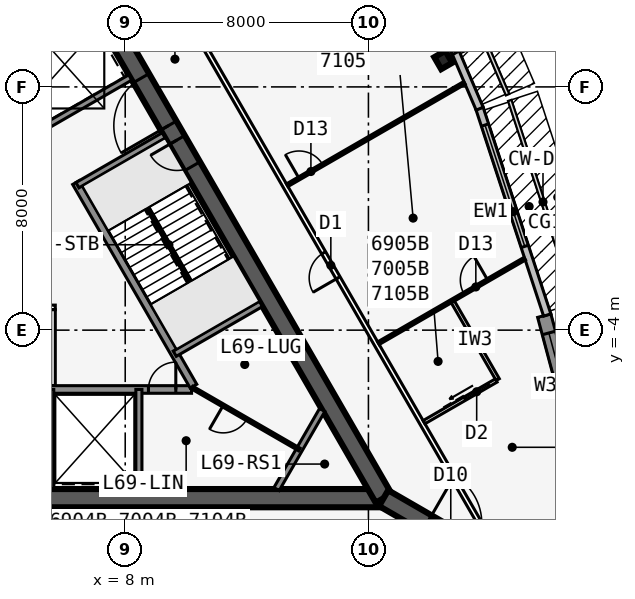
"""IFC4 building model, lengths in metres.
Left out: names, types, materials, properties, quantities, classifications, styles, units other than length and angle.
Written with IfcOpenShell. Run it as: python <this file> out.ifc"""

import sys

from ifc_helpers import new_model, si_unit, direction, frame, frame_2d, origin, origin_2d, place, context, subcontext, project, spatial, polyline, rectangle, i_section, outline, extrude, element, fill, save


model = new_model("IFC4")
c1 = context("Model", 3, precision=1e-05, world=origin(), true_north=direction((0.0, 1.0)))
c2 = subcontext(c1, "Body", "Model", "MODEL_VIEW")
j1 = project(units=[si_unit("LENGTHUNIT", "METRE"), si_unit("PLANEANGLEUNIT", "RADIAN")], contexts=[c1])
p1 = place(None, origin())
s1 = spatial("IfcSite", under=j1, at=p1, CompositionType="ELEMENT")
p2 = place(p1, origin())
s2 = spatial("IfcBuilding", under=s1, at=p2, CompositionType="ELEMENT")
p3 = place(p2, frame((0.0, 0.0, 260.9)))
s3 = spatial("IfcBuildingStorey", under=s2, at=p3, CompositionType="ELEMENT", Elevation=260.9)
p4 = place(p3, frame((-16.5, -9.526, 0.0), z_axis=(0.0, 0.0, 1.0), x_axis=(1.0, 0.0, 0.0)))
e1 = element("IfcWall", 1, at=p4, inside=s3, PredefinedType="SHEAR", context=c2, shape_type="SweptSolid", body=[
    extrude(rectangle(XDim=33.0, YDim=0.6, at=frame_2d((16.5, 0.0))), origin(), (0.0, 0.0, 1.0), 3.6),
])
p5 = place(p4, frame((14.05, 0.0, 0.0)))
e2 = element("IfcOpeningElement", 2, at=p5, cuts=e1, PredefinedType="OPENING", context=c2, shape_type="SweptSolid", body=[
    extrude(rectangle(XDim=1.8, YDim=2.13, at=frame_2d((0.9, 1.065))), frame((0.0, 0.31, 0.0), z_axis=(0.0, -1.0, 0.0), x_axis=(1.0, 0.0, 0.0)), (0.0, 0.0, 1.0), 0.62),
])
p6 = place(p3, frame((-0.55, -5.951, 0.0), z_axis=(0.0, 0.0, 1.0), x_axis=(1.0, 0.0, 0.0)))
e3 = element("IfcWall", 3, at=p6, inside=s3, PredefinedType="SOLIDWALL", context=c2, shape_type="SweptSolid", body=[
    extrude(rectangle(XDim=10.733, YDim=0.25, at=frame_2d((5.366, 0.0))), origin(), (0.0, 0.0, 1.0), 3.435),
])
p7 = place(p6, frame((9.314, 0.0, 0.0)))
e4 = element("IfcOpeningElement", 4, at=p7, cuts=e3, PredefinedType="OPENING", context=c2, shape_type="SweptSolid", body=[
    extrude(rectangle(XDim=0.9, YDim=2.13, at=frame_2d((0.45, 1.065))), frame((0.0, 0.135, 0.0), z_axis=(0.0, -1.0, 0.0), x_axis=(1.0, 0.0, 0.0)), (0.0, 0.0, 1.0), 0.27),
])
p8 = place(p6, frame((1.05, 0.0, 0.0)))
e5 = element("IfcOpeningElement", 5, at=p8, cuts=e3, PredefinedType="OPENING", context=c2, shape_type="SweptSolid", body=[
    extrude(rectangle(XDim=1.1, YDim=2.13, at=frame_2d((0.55, 1.065))), frame((0.0, 0.135, 0.0), z_axis=(0.0, -1.0, 0.0), x_axis=(1.0, 0.0, 0.0)), (0.0, 0.0, 1.0), 0.27),
])
p9 = place(p6, frame((4.05, 0.0, 0.0)))
e6 = element("IfcOpeningElement", 6, at=p9, cuts=e3, PredefinedType="OPENING", context=c2, shape_type="SweptSolid", body=[
    extrude(rectangle(XDim=1.1, YDim=2.13, at=frame_2d((0.55, 1.065))), frame((0.0, 0.135, 0.0), z_axis=(0.0, -1.0, 0.0), x_axis=(1.0, 0.0, 0.0)), (0.0, 0.0, 1.0), 0.27),
])
for number, where, z_axis, x_axis in (
    (7, (5.55, -5.951, 0.0), (0.0, 0.0, 1.0), (0.0, -1.0, 0.0)),
    (8, (8.45, -5.951, 0.0), (0.0, 0.0, 1.0), (0.0, -1.0, 0.0)),
):
    element("IfcWall", number, at=place(p3, frame(where, z_axis=z_axis, x_axis=x_axis)), inside=s3, PredefinedType="SOLIDWALL", context=c2, shape_type="SweptSolid", body=[
        extrude(rectangle(XDim=3.275, YDim=0.2, at=frame_2d((1.637, 0.0))), origin(), (0.0, 0.0, 1.0), 3.435),
    ])
p10 = place(p3, frame((16.5, -9.526, 0.0), z_axis=(0.0, 0.0, 1.0), x_axis=(-0.499999749417, 0.866025548458, 0.0)))
e9 = element("IfcWall", 9, at=p10, inside=s3, PredefinedType="SHEAR", context=c2, shape_type="SweptSolid", body=[
    extrude(rectangle(XDim=33.0, YDim=0.6, at=frame_2d((16.5, 0.0))), origin(), (0.0, 0.0, 1.0), 3.6),
])
p11 = place(p10, frame((14.15, 0.0, 0.0)))
e10 = element("IfcOpeningElement", 10, at=p11, cuts=e9, PredefinedType="OPENING", context=c2, shape_type="SweptSolid", body=[
    extrude(rectangle(XDim=1.8, YDim=2.13, at=frame_2d((0.9, 1.065))), frame((0.0, 0.31, 0.0), z_axis=(0.0, -1.0, 0.0), x_axis=(1.0, 0.0, 0.0)), (0.0, 0.0, 1.0), 0.62),
])
p12 = place(p10, frame((12.6, 0.0, 0.0)))
e11 = element("IfcOpeningElement", 11, at=p12, cuts=e9, PredefinedType="OPENING", context=c2, shape_type="SweptSolid", body=[
    extrude(rectangle(XDim=1.0, YDim=2.13, at=frame_2d((0.5, 1.065))), frame((0.0, 0.31, 0.0), z_axis=(0.0, -1.0, 0.0), x_axis=(1.0, 0.0, 0.0)), (0.0, 0.0, 1.0), 0.62),
])
p13 = place(p3, frame((10.245, -5.843, 0.0), z_axis=(0.0, 0.0, 1.0), x_axis=(-0.499993009313, 0.866029439822, 0.0)))
e12 = element("IfcWall", 12, at=p13, inside=s3, PredefinedType="SOLIDWALL", context=c2, shape_type="SweptSolid", body=[
    extrude(rectangle(XDim=7.733, YDim=0.25, at=frame_2d((3.866, 0.0))), origin(), (0.0, 0.0, 1.0), 3.435),
])
p14 = place(p3, frame((9.629, -4.775, 0.0), z_axis=(0.0, 0.0, 1.0), x_axis=(0.865995643347, 0.500051543047, 0.0)))
e13 = element("IfcWall", 13, at=p14, inside=s3, PredefinedType="SOLIDWALL", context=c2, shape_type="SweptSolid", body=[
    extrude(rectangle(XDim=3.275, YDim=0.2, at=frame_2d((1.638, 0.0))), origin(), (0.0, 0.0, 1.0), 3.435),
])
for number, where, z_axis, x_axis in (
    (14, (6.429, 0.767, 0.0), (0.0, 0.0, 1.0), (0.866, 0.5, 0.0)),
    (15, (5.329, 2.673, 0.0), (0.0, 0.0, 1.0), (0.866, 0.5, 0.0)),
    (16, (3.879, 5.184, 0.0), (0.0, 0.0, 1.0), (0.866, 0.5, 0.0)),
):
    element("IfcWall", number, at=place(p3, frame(where, z_axis=z_axis, x_axis=x_axis)), inside=s3, PredefinedType="SOLIDWALL", context=c2, shape_type="SweptSolid", body=[
        extrude(rectangle(XDim=3.275, YDim=0.2, at=frame_2d((1.637, 0.0))), origin(), (0.0, 0.0, 1.0), 3.435),
    ])
p15 = place(p3, frame((16.5, -9.526, 0.0), z_axis=(0.0, 0.0, 1.0), x_axis=(0.866031398331, -0.499989616998, 0.0)))
e17 = element("IfcWall", 17, at=p15, inside=s3, PredefinedType="SHEAR", context=c2, shape_type="SweptSolid", body=[
    extrude(rectangle(XDim=4.746, YDim=0.6, at=frame_2d((2.373, 0.0))), origin(), (0.0, 0.0, 1.0), 3.6),
])
p16 = place(p15, frame((1.65, 0.0, 0.0)))
e18 = element("IfcOpeningElement", 18, at=p16, cuts=e17, PredefinedType="OPENING", context=c2, shape_type="SweptSolid", body=[
    extrude(rectangle(XDim=1.8, YDim=2.13, at=frame_2d((0.9, 1.065))), frame((0.0, 0.31, 0.0), z_axis=(0.0, -1.0, 0.0), x_axis=(1.0, 0.0, 0.0)), (0.0, 0.0, 1.0), 0.62),
])
p17 = place(p3, frame((18.461, 4.885, 0.0), z_axis=(0.0, 0.0, 1.0), x_axis=(0.866025403784, 0.5, 0.0)))
e19 = element("IfcColumn", 19, at=p17, inside=s3, PredefinedType="COLUMN", context=c2, shape_type="SweptSolid", body=[
    extrude(i_section(OverallWidth=0.419, OverallDepth=0.455, WebThickness=0.042, FlangeThickness=0.068, at=origin_2d()), origin(), (0.0, 0.0, 1.0), 3.6),
])
p18 = place(p3, frame((21.783, -12.644, 0.0), z_axis=(0.0, 0.0, 1.0), x_axis=(0.25880328844, 0.965930048136, 0.0)))
e20 = element("IfcWall", 20, at=p18, inside=s3, PredefinedType="SOLIDWALL", context=c2, shape_type="SweptSolid", body=[
    extrude(outline(polyline([(4.782, 0.225), (0.431, 0.225), (0.406, 0.132), (0.06, 0.225), (0.0, 0.225), (0.0, -0.225), (4.782, -0.225), (4.782, 0.225)])), origin(), (0.0, 0.0, 1.0), 3.435),
])
p19 = place(p18, frame((1.031, 0.0, 0.45)))
e21 = element("IfcOpeningElement", 21, at=p19, cuts=e20, PredefinedType="OPENING", context=c2, shape_type="SweptSolid", body=[
    extrude(rectangle(XDim=3.0, YDim=2.6, at=frame_2d((1.5, 1.3))), frame((0.0, 0.235, 0.0), z_axis=(0.0, -1.0, 0.0), x_axis=(1.0, 0.0, 0.0)), (0.0, 0.0, 1.0), 0.47),
])
p20 = place(p3, frame((23.02, -8.141, 0.0), z_axis=(0.0, 0.0, 1.0), x_axis=(-0.25880328844, 0.965930048136, 0.0)))
e22 = element("IfcWall", 22, at=p20, inside=s3, PredefinedType="SOLIDWALL", context=c2, shape_type="SweptSolid", body=[
    extrude(rectangle(XDim=4.782, YDim=0.45, at=frame_2d((2.391, 0.0))), origin(), (0.0, 0.0, 1.0), 3.435),
])
p21 = place(p20, frame((0.591, 0.0, 0.45)))
e23 = element("IfcOpeningElement", 23, at=p21, cuts=e22, PredefinedType="OPENING", context=c2, shape_type="SweptSolid", body=[
    extrude(rectangle(XDim=3.6, YDim=2.6, at=frame_2d((1.8, 1.3))), frame((0.0, 0.235, 0.0), z_axis=(0.0, -1.0, 0.0), x_axis=(1.0, 0.0, 0.0)), (0.0, 0.0, 1.0), 0.47),
])
p22 = place(p3, frame((21.881, -3.503, 0.0), z_axis=(0.0, 0.0, 1.0), x_axis=(-0.311328857048, 0.95030223759, 0.0)))
e24 = element("IfcWall", 24, at=p22, inside=s3, PredefinedType="STANDARD", context=c2, shape_type="SweptSolid", body=[
    extrude(rectangle(XDim=7.153, YDim=0.25, at=frame_2d((3.576, 0.0))), origin(), (0.0, 0.0, 1.0), 3.435),
])
p23 = place(p22, frame((2.376, 0.0, 0.45)))
e25 = element("IfcOpeningElement", 25, at=p23, cuts=e24, PredefinedType="OPENING", context=c2, shape_type="SweptSolid", body=[
    extrude(rectangle(XDim=4.2, YDim=2.6, at=frame_2d((2.1, 1.3))), frame((0.0, 0.135, 0.0), z_axis=(0.0, -1.0, 0.0), x_axis=(1.0, 0.0, 0.0)), (0.0, 0.0, 1.0), 0.27),
])
p24 = place(p3, frame((19.658, 3.284, 0.0), z_axis=(0.0, 0.0, 1.0), x_axis=(-0.393290226175, 0.91941437774, 0.0)))
e26 = element("IfcWall", 26, at=p24, inside=s3, PredefinedType="STANDARD", context=c2, shape_type="SweptSolid", body=[
    extrude(rectangle(XDim=2.014, YDim=0.25, at=frame_2d((1.007, 0.0))), origin(), (0.0, 0.0, 1.0), 3.435),
])
p25 = place(p3, frame((18.873, 5.123, 0.0), z_axis=(0.0, 0.0, 1.0), x_axis=(-0.499993662806, 0.866029062534, 0.0)))
e27 = element("IfcWall", 27, at=p25, inside=s3, PredefinedType="STANDARD", context=c2, shape_type="SweptSolid", body=[
    extrude(rectangle(XDim=10.0, YDim=0.25, at=frame_2d((5.0, 0.0))), origin(), (0.0, 0.0, 1.0), 3.435),
])
p26 = place(p25, frame((2.9, 0.0, 0.45)))
e28 = element("IfcOpeningElement", 28, at=p26, cuts=e27, PredefinedType="OPENING", context=c2, shape_type="SweptSolid", body=[
    extrude(rectangle(XDim=4.2, YDim=2.6, at=frame_2d((2.1, 1.3))), frame((0.0, 0.135, 0.0), z_axis=(0.0, -1.0, 0.0), x_axis=(1.0, 0.0, 0.0)), (0.0, 0.0, 1.0), 0.27),
])
p27 = place(p3, frame((20.177, -11.245, 0.0), z_axis=(0.0, 0.0, 1.0), x_axis=(-0.499998875317, 0.866026053119, 0.0)))
e29 = element("IfcWall", 29, at=p27, inside=s3, PredefinedType="PARTITIONING", context=c2, shape_type="SweptSolid", body=[
    extrude(rectangle(XDim=39.654, YDim=0.15, at=frame_2d((19.827, 0.0))), origin(), (0.0, 0.0, 1.0), 3.435),
])
p28 = place(p27, frame((10.352, 0.0, 0.0)))
e30 = element("IfcOpeningElement", 30, at=p28, cuts=e29, PredefinedType="OPENING", context=c2, shape_type="SweptSolid", body=[
    extrude(rectangle(XDim=0.95, YDim=2.13, at=frame_2d((0.475, 1.065))), frame((0.0, 0.085, 0.0), z_axis=(0.0, -1.0, 0.0), x_axis=(1.0, 0.0, 0.0)), (0.0, 0.0, 1.0), 0.17),
])
p29 = place(p3, frame((16.329, -4.429, 0.0), z_axis=(0.0, 0.0, 1.0), x_axis=(0.866029066823, 0.499993655377, 0.0)))
e31 = element("IfcWall", 31, at=p29, inside=s3, PredefinedType="PARTITIONING", context=c2, shape_type="SweptSolid", body=[
    extrude(rectangle(XDim=5.559, YDim=0.1, at=frame_2d((2.779, 0.0))), origin(), (0.0, 0.0, 1.0), 2.823),
])
p30 = place(p29, frame((3.25, 0.0, 0.0)))
e32 = element("IfcOpeningElement", 32, at=p30, cuts=e31, PredefinedType="OPENING", context=c2, shape_type="SweptSolid", body=[
    extrude(rectangle(XDim=0.9, YDim=2.13, at=frame_2d((0.45, 1.065))), frame((0.0, 0.06, 0.0), z_axis=(0.0, -1.0, 0.0), x_axis=(1.0, 0.0, 0.0)), (0.0, 0.0, 1.0), 0.12),
])
p31 = place(p3, frame((13.329, 0.767, 0.0), z_axis=(0.0, 0.0, 1.0), x_axis=(0.866020720842, 0.500008111007, 0.0)))
e33 = element("IfcWall", 33, at=p31, inside=s3, PredefinedType="PARTITIONING", context=c2, shape_type="SweptSolid", body=[
    extrude(rectangle(XDim=6.732, YDim=0.1, at=frame_2d((3.366, 0.0))), origin(), (0.0, 0.0, 1.0), 3.435),
])
p32 = place(p31, frame((0.45, 0.0, 0.0)))
e34 = element("IfcOpeningElement", 34, at=p32, cuts=e33, PredefinedType="OPENING", context=c2, shape_type="SweptSolid", body=[
    extrude(rectangle(XDim=0.9, YDim=2.13, at=frame_2d((0.45, 1.065))), frame((0.0, 0.06, 0.0), z_axis=(0.0, -1.0, 0.0), x_axis=(1.0, 0.0, 0.0)), (0.0, 0.0, 1.0), 0.12),
])
p33 = place(p3, frame((20.253, -5.627, 0.0), z_axis=(0.0, 0.0, 1.0), x_axis=(-0.50002537861, 0.866010750942, 0.0)))
e35 = element("IfcWall", 35, at=p33, inside=s3, PredefinedType="PLUMBINGWALL", context=c2, shape_type="SweptSolid", body=[
    extrude(rectangle(XDim=3.0, YDim=0.12, at=frame_2d((1.5, 0.0))), origin(), (0.0, 0.0, 1.0), 3.435),
])
p34 = place(p3, frame((17.829, -7.027, 0.0), z_axis=(0.0, 0.0, 1.0), x_axis=(0.866035715982, 0.499982138324, 0.0)))
e36 = element("IfcWall", 36, at=p34, inside=s3, PredefinedType="PLUMBINGWALL", context=c2, shape_type="SweptSolid", body=[
    extrude(rectangle(XDim=2.74, YDim=0.12, at=frame_2d((1.37, 0.0))), origin(), (0.0, 0.0, 1.0), 3.435),
])
p35 = place(p34, frame((1.55, 0.0, 0.0)))
e37 = element("IfcOpeningElement", 37, at=p35, cuts=e36, PredefinedType="OPENING", context=c2, shape_type="SweptSolid", body=[
    extrude(rectangle(XDim=0.9, YDim=2.13, at=frame_2d((0.45, 1.065))), frame((0.0, 0.07, 0.0), z_axis=(0.0, -1.0, 0.0), x_axis=(1.0, 0.0, 0.0)), (0.0, 0.0, 1.0), 0.14),
])
p36 = place(p3, frame((-2.65, -3.251, 0.0), z_axis=(0.0, 0.0, 1.0), x_axis=(1.0, 0.0, 0.0)))
e38 = element("IfcWall", 38, at=p36, inside=s3, PredefinedType="PARTITIONING", context=c2, shape_type="SweptSolid", body=[
    extrude(rectangle(XDim=8.35, YDim=0.15, at=frame_2d((4.175, 0.0))), origin(), (0.0, 0.0, 1.0), 3.435),
])
p37 = place(p3, frame((5.625, -5.826, 0.0), z_axis=(0.0, 0.0, 1.0), x_axis=(0.0, 1.0, 0.0)))
e39 = element("IfcWall", 39, at=p37, inside=s3, PredefinedType="PARTITIONING", context=c2, shape_type="SweptSolid", body=[
    extrude(rectangle(XDim=2.5, YDim=0.15, at=frame_2d((1.25, 0.0))), origin(), (0.0, 0.0, 1.0), 3.435),
])
p38 = place(p3, frame((14.479, -6.626, 0.0), z_axis=(0.0, 0.0, 1.0), x_axis=(-0.499952404951, -0.866052881055, 0.0)))
e40 = element("IfcWall", 40, at=p38, inside=s3, PredefinedType="SOLIDWALL", context=c2, shape_type="SweptSolid", body=[
    extrude(rectangle(XDim=3.002, YDim=0.2, at=frame_2d((1.501, 0.0))), origin(), (0.0, 0.0, 1.0), 3.435),
])
p39 = place(p3, frame((13.729, -7.926, 0.0), z_axis=(0.0, 0.0, 1.0), x_axis=(-0.866029956157, 0.499992114976, 0.0)))
e41 = element("IfcWall", 41, at=p39, inside=s3, PredefinedType="PARTITIONING", context=c2, shape_type="SweptSolid", body=[
    extrude(rectangle(XDim=4.075, YDim=0.1, at=frame_2d((2.038, 0.0))), origin(), (0.0, 0.0, 1.0), 3.435),
])
p40 = place(p39, frame((1.995, 0.0, 0.0)))
e42 = element("IfcOpeningElement", 42, at=p40, cuts=e41, PredefinedType="OPENING", context=c2, shape_type="SweptSolid", body=[
    extrude(rectangle(XDim=0.9, YDim=2.13, at=frame_2d((0.45, 1.065))), frame((0.0, 0.06, 0.0), z_axis=(0.0, -1.0, 0.0), x_axis=(1.0, 0.0, 0.0)), (0.0, 0.0, 1.0), 0.12),
])
p41 = place(p3, frame((10.135, -2.401, 0.0), z_axis=(0.0, 0.0, 1.0), x_axis=(-0.499992232847, 0.866029888106, 0.0)))
e43 = element("IfcWall", 43, at=p41, inside=s3, PredefinedType="SOLIDWALL", context=c2, shape_type="SweptSolid", body=[
    extrude(rectangle(XDim=2.794, YDim=0.1, at=frame_2d((1.397, 0.0))), origin(), (0.0, 0.0, 1.0), 3.6),
])
p42 = place(p19, origin())
e44 = element("IfcWindow", 44, at=p42, inside=s3, PartitioningType="SINGLE_PANEL", PredefinedType="WINDOW", context=c2, shape_type="SweptSolid", body=[
    extrude(rectangle(XDim=3.0, YDim=2.6, at=frame_2d((1.5, 1.3))), frame((0.0, 0.03, 0.0), z_axis=(0.0, -1.0, 0.0), x_axis=(1.0, 0.0, 0.0)), (0.0, 0.0, 1.0), 0.06),
])
fill(e21, e44)
p43 = place(p21, origin())
e45 = element("IfcWindow", 45, at=p43, inside=s3, PartitioningType="SINGLE_PANEL", PredefinedType="WINDOW", context=c2, shape_type="SweptSolid", body=[
    extrude(rectangle(XDim=3.6, YDim=2.6, at=frame_2d((1.8, 1.3))), frame((0.0, 0.03, 0.0), z_axis=(0.0, -1.0, 0.0), x_axis=(1.0, 0.0, 0.0)), (0.0, 0.0, 1.0), 0.06),
])
fill(e23, e45)
p44 = place(p23, origin())
e46 = element("IfcWindow", 46, at=p44, inside=s3, PartitioningType="SINGLE_PANEL", PredefinedType="WINDOW", context=c2, shape_type="SweptSolid", body=[
    extrude(rectangle(XDim=4.2, YDim=2.6, at=frame_2d((2.1, 1.3))), frame((0.0, 0.03, 0.0), z_axis=(0.0, -1.0, 0.0), x_axis=(1.0, 0.0, 0.0)), (0.0, 0.0, 1.0), 0.06),
])
fill(e25, e46)
p45 = place(p30, origin())
e47 = element("IfcDoor", 47, at=p45, inside=s3, OperationType="SINGLE_SWING_RIGHT", PredefinedType="DOOR", context=c2, shape_type="SweptSolid", body=[
    extrude(rectangle(XDim=0.9, YDim=2.13, at=frame_2d((0.45, 1.065))), frame((0.0, 0.025, 0.0), z_axis=(0.0, -1.0, 0.0), x_axis=(1.0, 0.0, 0.0)), (0.0, 0.0, 1.0), 0.05),
])
fill(e32, e47)
p46 = place(p32, origin())
e48 = element("IfcDoor", 48, at=p46, inside=s3, OperationType="SINGLE_SWING_LEFT", PredefinedType="DOOR", context=c2, shape_type="SweptSolid", body=[
    extrude(rectangle(XDim=0.9, YDim=2.13, at=frame_2d((0.45, 1.065))), frame((0.0, 0.025, 0.0), z_axis=(0.0, -1.0, 0.0), x_axis=(1.0, 0.0, 0.0)), (0.0, 0.0, 1.0), 0.05),
])
fill(e34, e48)
p47 = place(p35, origin())
e49 = element("IfcDoor", 49, at=p47, inside=s3, OperationType="SLIDING_TO_LEFT", PredefinedType="DOOR", context=c2, shape_type="SweptSolid", body=[
    extrude(rectangle(XDim=0.9, YDim=2.13, at=frame_2d((0.45, 1.065))), frame((0.0, 0.025, 0.0), z_axis=(0.0, -1.0, 0.0), x_axis=(1.0, 0.0, 0.0)), (0.0, 0.0, 1.0), 0.05),
])
fill(e37, e49)
p48 = place(p28, origin())
e50 = element("IfcDoor", 50, at=p48, inside=s3, OperationType="SINGLE_SWING_LEFT", PredefinedType="DOOR", context=c2, shape_type="SweptSolid", body=[
    extrude(rectangle(XDim=0.95, YDim=2.13, at=frame_2d((0.475, 1.065))), frame((0.0, 0.025, 0.0), z_axis=(0.0, -1.0, 0.0), x_axis=(1.0, 0.0, 0.0)), (0.0, 0.0, 1.0), 0.05),
])
fill(e30, e50)
p49 = place(p11, origin())
e51 = element("IfcDoor", 51, at=p49, inside=s3, OperationType="DOUBLE_DOOR_SINGLE_SWING", PredefinedType="DOOR", context=c2, shape_type="SweptSolid", body=[
    extrude(rectangle(XDim=1.8, YDim=2.13, at=frame_2d((0.9, 1.065))), frame((0.0, 0.025, 0.0), z_axis=(0.0, -1.0, 0.0), x_axis=(1.0, 0.0, 0.0)), (0.0, 0.0, 1.0), 0.05),
])
fill(e10, e51)
p50 = place(p12, origin())
e52 = element("IfcDoor", 52, at=p50, inside=s3, OperationType="SINGLE_SWING_RIGHT", PredefinedType="DOOR", context=c2, shape_type="SweptSolid", body=[
    extrude(rectangle(XDim=1.0, YDim=2.13, at=frame_2d((0.5, 1.065))), frame((0.0, 0.025, 0.0), z_axis=(0.0, -1.0, 0.0), x_axis=(1.0, 0.0, 0.0)), (0.0, 0.0, 1.0), 0.05),
])
fill(e11, e52)
p51 = place(p7, origin())
e53 = element("IfcDoor", 53, at=p51, inside=s3, OperationType="SINGLE_SWING_RIGHT", PredefinedType="DOOR", context=c2, shape_type="SweptSolid", body=[
    extrude(rectangle(XDim=0.9, YDim=2.13, at=frame_2d((0.45, 1.065))), frame((0.0, 0.025, 0.0), z_axis=(0.0, -1.0, 0.0), x_axis=(1.0, 0.0, 0.0)), (0.0, 0.0, 1.0), 0.05),
])
fill(e4, e53)
p52 = place(p40, origin())
e54 = element("IfcDoor", 54, at=p52, inside=s3, OperationType="SINGLE_SWING_RIGHT", PredefinedType="DOOR", context=c2, shape_type="SweptSolid", body=[
    extrude(rectangle(XDim=0.9, YDim=2.13, at=frame_2d((0.45, 1.065))), frame((0.0, 0.025, 0.0), z_axis=(0.0, -1.0, 0.0), x_axis=(1.0, 0.0, 0.0)), (0.0, 0.0, 1.0), 0.05),
])
fill(e42, e54)
save(model, sys.argv[1])
